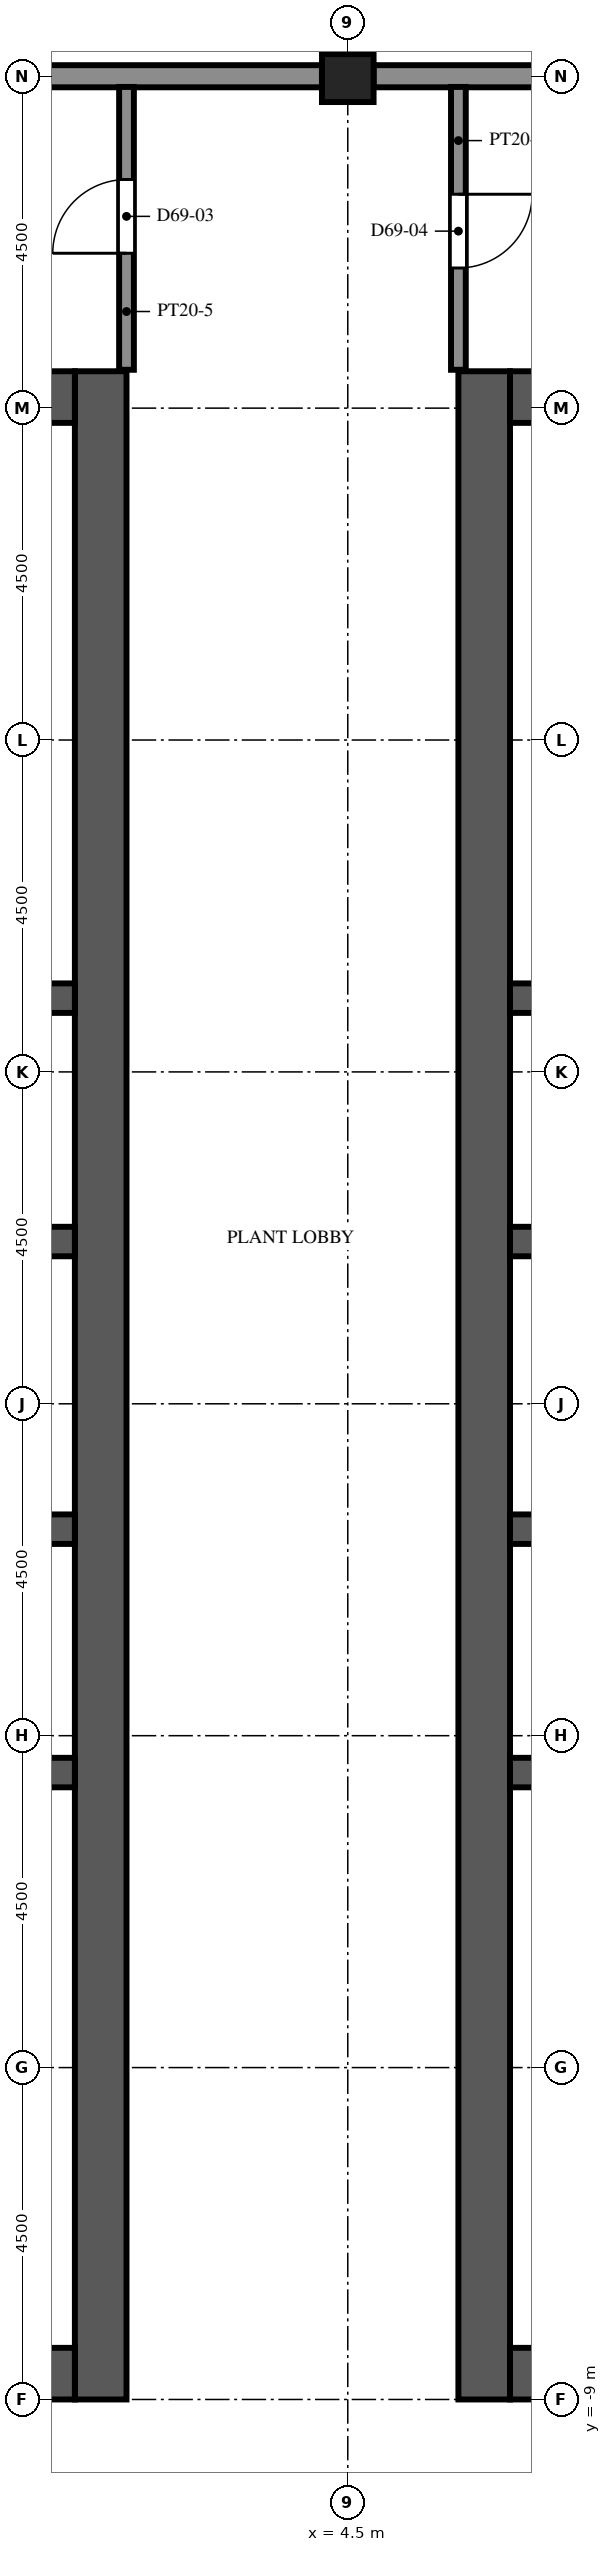
"""IFC4 building model, lengths in metres.
Left out: names, types, materials, properties, quantities, classifications, styles, units other than length and angle.
Written with IfcOpenShell. Run it as: python <this file> out.ifc"""

import sys

from ifc_helpers import new_model, si_unit, direction, frame, frame_2d, origin, origin_2d, place, context, subcontext, project, spatial, rectangle, extrude, element, fill, save


model = new_model("IFC4")
c1 = context("Model", 3, precision=1e-05, world=origin(), true_north=direction((0.0, 1.0)))
c2 = subcontext(c1, "Body", "Model", "MODEL_VIEW")
j1 = project(units=[si_unit("LENGTHUNIT", "METRE"), si_unit("PLANEANGLEUNIT", "RADIAN")], contexts=[c1])
p1 = place(None, origin())
s1 = spatial("IfcSite", under=j1, at=p1, CompositionType="ELEMENT")
p2 = place(p1, origin())
s2 = spatial("IfcBuilding", under=s1, at=p2, CompositionType="ELEMENT")
p3 = place(p2, frame((0.0, 0.0, 306.4)))
s3 = spatial("IfcBuildingStorey", under=s2, at=p3, CompositionType="ELEMENT", Elevation=306.4)
p4 = place(p3, frame((4.5, 22.5, 0.0), z_axis=(0.0, 0.0, 1.0), x_axis=(1.0, 0.0, 0.0)))
e1 = element("IfcColumn", 1, at=p4, inside=s3, PredefinedType="COLUMN", context=c2, shape_type="SweptSolid", body=[
    extrude(rectangle(XDim=0.7, YDim=0.7, at=origin_2d()), origin(), (0.0, 0.0, 1.0), 5.4),
])
p5 = place(p3, frame((1.15, -9.0, 0.0), z_axis=(0.0, 0.0, 1.0), x_axis=(0.0, 1.0, 0.0)))
e2 = element("IfcWall", 2, at=p5, inside=s3, PredefinedType="SHEAR", context=c2, shape_type="SweptSolid", body=[
    extrude(rectangle(XDim=27.5, YDim=0.7, at=frame_2d((13.75, 0.0))), origin(), (0.0, 0.0, 1.0), 5.4),
])
p6 = place(p5, frame((12.55, 0.0, 0.0)))
e3 = element("IfcOpeningElement", 3, at=p6, cuts=e2, PredefinedType="OPENING", context=c2, shape_type="SweptSolid", body=[
    extrude(rectangle(XDim=2.4, YDim=2.4, at=frame_2d((1.2, 1.2))), frame((0.0, 0.36, 0.0), z_axis=(0.0, -1.0, 0.0), x_axis=(1.0, 0.0, 0.0)), (0.0, 0.0, 1.0), 0.72),
])
p7 = place(p5, frame((5.46, 0.0, 0.0)))
e4 = element("IfcOpeningElement", 4, at=p7, cuts=e2, PredefinedType="OPENING", context=c2, shape_type="SweptSolid", body=[
    extrude(rectangle(XDim=0.968, YDim=2.1, at=frame_2d((0.484, 1.05))), frame((0.0, 0.36, 0.0), z_axis=(0.0, -1.0, 0.0), x_axis=(1.0, 0.0, 0.0)), (0.0, 0.0, 1.0), 0.72),
])
p8 = place(p5, frame((23.54, 0.0, 0.0)))
e5 = element("IfcOpeningElement", 5, at=p8, cuts=e2, PredefinedType="OPENING", context=c2, shape_type="SweptSolid", body=[
    extrude(rectangle(XDim=1.2, YDim=2.1, at=frame_2d((0.6, 1.05))), frame((0.0, 0.36, 0.0), z_axis=(0.0, -1.0, 0.0), x_axis=(1.0, 0.0, 0.0)), (0.0, 0.0, 1.0), 0.72),
])
for number, where, z_axis, x_axis in (
    (6, (-9.8, -8.65, 0.0), (0.0, 0.0, 1.0), (1.0, 0.0, 0.0)),
    (7, (-9.8, 18.15, 0.0), (0.0, 0.0, 1.0), (1.0, 0.0, 0.0)),
):
    element("IfcWall", number, at=place(p3, frame(where, z_axis=z_axis, x_axis=x_axis)), inside=s3, PredefinedType="SHEAR", context=c2, shape_type="SweptSolid", body=[
        extrude(rectangle(XDim=10.6, YDim=0.7, at=frame_2d((5.3, 0.0))), origin(), (0.0, 0.0, 1.0), 5.4),
    ])
p9 = place(p3, frame((-9.8, -0.5, 0.0), z_axis=(0.0, 0.0, 1.0), x_axis=(1.0, 0.0, 0.0)))
e8 = element("IfcWall", 8, at=p9, inside=s3, PredefinedType="SHEAR", context=c2, shape_type="SweptSolid", body=[
    extrude(rectangle(XDim=10.6, YDim=0.4, at=frame_2d((5.3, 0.0))), origin(), (0.0, 0.0, 1.0), 5.4),
])
p10 = place(p3, frame((-9.8, 2.8, 0.0), z_axis=(0.0, 0.0, 1.0), x_axis=(1.0, 0.0, 0.0)))
e9 = element("IfcWall", 9, at=p10, inside=s3, PredefinedType="SHEAR", context=c2, shape_type="SweptSolid", body=[
    extrude(rectangle(XDim=10.6, YDim=0.4, at=frame_2d((5.3, 0.0))), origin(), (0.0, 0.0, 1.0), 5.4),
])
p11 = place(p10, frame((0.688, 0.0, 0.0)))
e10 = element("IfcOpeningElement", 10, at=p11, cuts=e9, PredefinedType="OPENING", context=c2, shape_type="SweptSolid", body=[
    extrude(rectangle(XDim=1.1, YDim=2.1, at=frame_2d((0.55, 1.05))), frame((0.0, 0.21, 0.0), z_axis=(0.0, -1.0, 0.0), x_axis=(1.0, 0.0, 0.0)), (0.0, 0.0, 1.0), 0.42),
])
p12 = place(p10, frame((3.438, 0.0, 0.0)))
e11 = element("IfcOpeningElement", 11, at=p12, cuts=e9, PredefinedType="OPENING", context=c2, shape_type="SweptSolid", body=[
    extrude(rectangle(XDim=1.1, YDim=2.1, at=frame_2d((0.55, 1.05))), frame((0.0, 0.21, 0.0), z_axis=(0.0, -1.0, 0.0), x_axis=(1.0, 0.0, 0.0)), (0.0, 0.0, 1.0), 0.42),
])
p13 = place(p10, frame((6.113, 0.0, 0.0)))
e12 = element("IfcOpeningElement", 12, at=p13, cuts=e9, PredefinedType="OPENING", context=c2, shape_type="SweptSolid", body=[
    extrude(rectangle(XDim=1.0, YDim=2.1, at=frame_2d((0.5, 1.05))), frame((0.0, 0.21, 0.0), z_axis=(0.0, -1.0, 0.0), x_axis=(1.0, 0.0, 0.0)), (0.0, 0.0, 1.0), 0.42),
])
p14 = place(p10, frame((8.863, 0.0, 0.0)))
e13 = element("IfcOpeningElement", 13, at=p14, cuts=e9, PredefinedType="OPENING", context=c2, shape_type="SweptSolid", body=[
    extrude(rectangle(XDim=1.0, YDim=2.1, at=frame_2d((0.5, 1.05))), frame((0.0, 0.21, 0.0), z_axis=(0.0, -1.0, 0.0), x_axis=(1.0, 0.0, 0.0)), (0.0, 0.0, 1.0), 0.42),
])
p15 = place(p3, frame((-9.8, 6.7, 0.0), z_axis=(0.0, 0.0, 1.0), x_axis=(1.0, 0.0, 0.0)))
e14 = element("IfcWall", 14, at=p15, inside=s3, PredefinedType="SHEAR", context=c2, shape_type="SweptSolid", body=[
    extrude(rectangle(XDim=10.6, YDim=0.4, at=frame_2d((5.3, 0.0))), origin(), (0.0, 0.0, 1.0), 5.4),
])
p16 = place(p15, frame((0.738, 0.0, 0.0)))
e15 = element("IfcOpeningElement", 15, at=p16, cuts=e14, PredefinedType="OPENING", context=c2, shape_type="SweptSolid", body=[
    extrude(rectangle(XDim=1.0, YDim=2.1, at=frame_2d((0.5, 1.05))), frame((0.0, 0.21, 0.0), z_axis=(0.0, -1.0, 0.0), x_axis=(1.0, 0.0, 0.0)), (0.0, 0.0, 1.0), 0.42),
])
p17 = place(p15, frame((3.488, 0.0, 0.0)))
e16 = element("IfcOpeningElement", 16, at=p17, cuts=e14, PredefinedType="OPENING", context=c2, shape_type="SweptSolid", body=[
    extrude(rectangle(XDim=1.0, YDim=2.1, at=frame_2d((0.5, 1.05))), frame((0.0, 0.21, 0.0), z_axis=(0.0, -1.0, 0.0), x_axis=(1.0, 0.0, 0.0)), (0.0, 0.0, 1.0), 0.42),
])
p18 = place(p15, frame((6.113, 0.0, 0.0)))
e17 = element("IfcOpeningElement", 17, at=p18, cuts=e14, PredefinedType="OPENING", context=c2, shape_type="SweptSolid", body=[
    extrude(rectangle(XDim=1.0, YDim=2.1, at=frame_2d((0.5, 1.05))), frame((0.0, 0.21, 0.0), z_axis=(0.0, -1.0, 0.0), x_axis=(1.0, 0.0, 0.0)), (0.0, 0.0, 1.0), 0.42),
])
p19 = place(p15, frame((8.863, 0.0, 0.0)))
e18 = element("IfcOpeningElement", 18, at=p19, cuts=e14, PredefinedType="OPENING", context=c2, shape_type="SweptSolid", body=[
    extrude(rectangle(XDim=1.0, YDim=2.1, at=frame_2d((0.5, 1.05))), frame((0.0, 0.21, 0.0), z_axis=(0.0, -1.0, 0.0), x_axis=(1.0, 0.0, 0.0)), (0.0, 0.0, 1.0), 0.42),
])
p20 = place(p3, frame((-9.8, 10.0, 0.0), z_axis=(0.0, 0.0, 1.0), x_axis=(1.0, 0.0, 0.0)))
e19 = element("IfcWall", 19, at=p20, inside=s3, PredefinedType="SHEAR", context=c2, shape_type="SweptSolid", body=[
    extrude(rectangle(XDim=10.6, YDim=0.4, at=frame_2d((5.3, 0.0))), origin(), (0.0, 0.0, 1.0), 5.4),
])
p21 = place(p3, frame((6.35, -9.0, 0.0), z_axis=(0.0, 0.0, 1.0), x_axis=(0.0, 1.0, 0.0)))
e20 = element("IfcWall", 20, at=p21, inside=s3, PredefinedType="SHEAR", context=c2, shape_type="SweptSolid", body=[
    extrude(rectangle(XDim=27.5, YDim=0.7, at=frame_2d((13.75, 0.0))), origin(), (0.0, 0.0, 1.0), 5.4),
])
p22 = place(p21, frame((12.55, 0.0, 0.0)))
e21 = element("IfcOpeningElement", 21, at=p22, cuts=e20, PredefinedType="OPENING", context=c2, shape_type="SweptSolid", body=[
    extrude(rectangle(XDim=2.4, YDim=2.4, at=frame_2d((1.2, 1.2))), frame((0.0, 0.36, 0.0), z_axis=(0.0, -1.0, 0.0), x_axis=(1.0, 0.0, 0.0)), (0.0, 0.0, 1.0), 0.72),
])
p23 = place(p21, frame((3.9, 0.0, 0.0)))
e22 = element("IfcOpeningElement", 22, at=p23, cuts=e20, PredefinedType="OPENING", context=c2, shape_type="SweptSolid", body=[
    extrude(rectangle(XDim=1.2, YDim=2.1, at=frame_2d((0.6, 1.05))), frame((0.0, 0.36, 0.0), z_axis=(0.0, -1.0, 0.0), x_axis=(1.0, 0.0, 0.0)), (0.0, 0.0, 1.0), 0.72),
])
p24 = place(p21, frame((22.4, 0.0, 0.0)))
e23 = element("IfcOpeningElement", 23, at=p24, cuts=e20, PredefinedType="OPENING", context=c2, shape_type="SweptSolid", body=[
    extrude(rectangle(XDim=1.2, YDim=2.1, at=frame_2d((0.6, 1.05))), frame((0.0, 0.36, 0.0), z_axis=(0.0, -1.0, 0.0), x_axis=(1.0, 0.0, 0.0)), (0.0, 0.0, 1.0), 0.72),
])
for number, where, z_axis, x_axis in (
    (24, (6.7, -8.65, 0.0), (0.0, 0.0, 1.0), (1.0, 0.0, 0.0)),
    (25, (6.7, 18.15, 0.0), (0.0, 0.0, 1.0), (1.0, 0.0, 0.0)),
):
    element("IfcWall", number, at=place(p3, frame(where, z_axis=z_axis, x_axis=x_axis)), inside=s3, PredefinedType="SHEAR", context=c2, shape_type="SweptSolid", body=[
        extrude(rectangle(XDim=10.6, YDim=0.7, at=frame_2d((5.3, 0.0))), origin(), (0.0, 0.0, 1.0), 5.4),
    ])
p25 = place(p3, frame((6.7, -0.5, 0.0), z_axis=(0.0, 0.0, 1.0), x_axis=(1.0, 0.0, 0.0)))
e26 = element("IfcWall", 26, at=p25, inside=s3, PredefinedType="SHEAR", context=c2, shape_type="SweptSolid", body=[
    extrude(rectangle(XDim=10.6, YDim=0.4, at=frame_2d((5.3, 0.0))), origin(), (0.0, 0.0, 1.0), 5.4),
])
p26 = place(p3, frame((6.7, 2.8, 0.0), z_axis=(0.0, 0.0, 1.0), x_axis=(1.0, 0.0, 0.0)))
e27 = element("IfcWall", 27, at=p26, inside=s3, PredefinedType="SHEAR", context=c2, shape_type="SweptSolid", body=[
    extrude(rectangle(XDim=10.6, YDim=0.4, at=frame_2d((5.3, 0.0))), origin(), (0.0, 0.0, 1.0), 5.4),
])
p27 = place(p26, frame((0.688, 0.0, 0.0)))
e28 = element("IfcOpeningElement", 28, at=p27, cuts=e27, PredefinedType="OPENING", context=c2, shape_type="SweptSolid", body=[
    extrude(rectangle(XDim=1.1, YDim=2.1, at=frame_2d((0.55, 1.05))), frame((0.0, 0.21, 0.0), z_axis=(0.0, -1.0, 0.0), x_axis=(1.0, 0.0, 0.0)), (0.0, 0.0, 1.0), 0.42),
])
p28 = place(p26, frame((3.438, 0.0, 0.0)))
e29 = element("IfcOpeningElement", 29, at=p28, cuts=e27, PredefinedType="OPENING", context=c2, shape_type="SweptSolid", body=[
    extrude(rectangle(XDim=1.1, YDim=2.1, at=frame_2d((0.55, 1.05))), frame((0.0, 0.21, 0.0), z_axis=(0.0, -1.0, 0.0), x_axis=(1.0, 0.0, 0.0)), (0.0, 0.0, 1.0), 0.42),
])
p29 = place(p26, frame((6.113, 0.0, 0.0)))
e30 = element("IfcOpeningElement", 30, at=p29, cuts=e27, PredefinedType="OPENING", context=c2, shape_type="SweptSolid", body=[
    extrude(rectangle(XDim=1.0, YDim=2.1, at=frame_2d((0.5, 1.05))), frame((0.0, 0.21, 0.0), z_axis=(0.0, -1.0, 0.0), x_axis=(1.0, 0.0, 0.0)), (0.0, 0.0, 1.0), 0.42),
])
p30 = place(p26, frame((8.863, 0.0, 0.0)))
e31 = element("IfcOpeningElement", 31, at=p30, cuts=e27, PredefinedType="OPENING", context=c2, shape_type="SweptSolid", body=[
    extrude(rectangle(XDim=1.0, YDim=2.1, at=frame_2d((0.5, 1.05))), frame((0.0, 0.21, 0.0), z_axis=(0.0, -1.0, 0.0), x_axis=(1.0, 0.0, 0.0)), (0.0, 0.0, 1.0), 0.42),
])
p31 = place(p3, frame((6.7, 6.7, 0.0), z_axis=(0.0, 0.0, 1.0), x_axis=(1.0, 0.0, 0.0)))
e32 = element("IfcWall", 32, at=p31, inside=s3, PredefinedType="SHEAR", context=c2, shape_type="SweptSolid", body=[
    extrude(rectangle(XDim=10.6, YDim=0.4, at=frame_2d((5.3, 0.0))), origin(), (0.0, 0.0, 1.0), 5.4),
])
p32 = place(p31, frame((0.738, 0.0, 0.0)))
e33 = element("IfcOpeningElement", 33, at=p32, cuts=e32, PredefinedType="OPENING", context=c2, shape_type="SweptSolid", body=[
    extrude(rectangle(XDim=1.0, YDim=2.1, at=frame_2d((0.5, 1.05))), frame((0.0, 0.21, 0.0), z_axis=(0.0, -1.0, 0.0), x_axis=(1.0, 0.0, 0.0)), (0.0, 0.0, 1.0), 0.42),
])
p33 = place(p31, frame((3.488, 0.0, 0.0)))
e34 = element("IfcOpeningElement", 34, at=p33, cuts=e32, PredefinedType="OPENING", context=c2, shape_type="SweptSolid", body=[
    extrude(rectangle(XDim=1.0, YDim=2.1, at=frame_2d((0.5, 1.05))), frame((0.0, 0.21, 0.0), z_axis=(0.0, -1.0, 0.0), x_axis=(1.0, 0.0, 0.0)), (0.0, 0.0, 1.0), 0.42),
])
p34 = place(p31, frame((6.113, 0.0, 0.0)))
e35 = element("IfcOpeningElement", 35, at=p34, cuts=e32, PredefinedType="OPENING", context=c2, shape_type="SweptSolid", body=[
    extrude(rectangle(XDim=1.0, YDim=2.1, at=frame_2d((0.5, 1.05))), frame((0.0, 0.21, 0.0), z_axis=(0.0, -1.0, 0.0), x_axis=(1.0, 0.0, 0.0)), (0.0, 0.0, 1.0), 0.42),
])
p35 = place(p31, frame((8.863, 0.0, 0.0)))
e36 = element("IfcOpeningElement", 36, at=p35, cuts=e32, PredefinedType="OPENING", context=c2, shape_type="SweptSolid", body=[
    extrude(rectangle(XDim=1.0, YDim=2.1, at=frame_2d((0.5, 1.05))), frame((0.0, 0.21, 0.0), z_axis=(0.0, -1.0, 0.0), x_axis=(1.0, 0.0, 0.0)), (0.0, 0.0, 1.0), 0.42),
])
p36 = place(p3, frame((6.7, 10.0, 0.0), z_axis=(0.0, 0.0, 1.0), x_axis=(1.0, 0.0, 0.0)))
e37 = element("IfcWall", 37, at=p36, inside=s3, PredefinedType="SHEAR", context=c2, shape_type="SweptSolid", body=[
    extrude(rectangle(XDim=10.6, YDim=0.4, at=frame_2d((5.3, 0.0))), origin(), (0.0, 0.0, 1.0), 5.4),
])
for number, where, z_axis, x_axis in (
    (38, (8.65, 22.5, 0.0), (0.0, 0.0, 1.0), (-1.0, 0.0, 0.0)),
    (39, (4.15, 22.5, 0.0), (0.0, 0.0, 1.0), (-1.0, 0.0, 0.0)),
):
    element("IfcWall", number, at=place(p3, frame(where, z_axis=z_axis, x_axis=x_axis)), inside=s3, PredefinedType="SOLIDWALL", context=c2, shape_type="SweptSolid", body=[
        extrude(rectangle(XDim=3.8, YDim=0.3, at=frame_2d((1.9, 0.0))), origin(), (0.0, 0.0, 1.0), 0.85),
    ])
p37 = place(p3, frame((1.5, 18.52, 0.0), z_axis=(0.0, 0.0, 1.0), x_axis=(0.0, 1.0, 0.0)))
e40 = element("IfcWall", 40, at=p37, inside=s3, PredefinedType="PARTITIONING", context=c2, shape_type="SweptSolid", body=[
    extrude(rectangle(XDim=3.835, YDim=0.2, at=frame_2d((1.917, 0.0))), origin(), (0.0, 0.0, 1.0), 4.8),
])
p38 = place(p37, frame((1.58, 0.0, 0.0)))
e41 = element("IfcOpeningElement", 41, at=p38, cuts=e40, PredefinedType="OPENING", context=c2, shape_type="SweptSolid", body=[
    extrude(rectangle(XDim=1.0, YDim=2.1, at=frame_2d((0.5, 1.05))), frame((0.0, 0.11, 0.0), z_axis=(0.0, -1.0, 0.0), x_axis=(1.0, 0.0, 0.0)), (0.0, 0.0, 1.0), 0.22),
])
p39 = place(p3, frame((6.0, 22.355, 0.0), z_axis=(0.0, 0.0, 1.0), x_axis=(0.0, -1.0, 0.0)))
e42 = element("IfcWall", 42, at=p39, inside=s3, PredefinedType="PARTITIONING", context=c2, shape_type="SweptSolid", body=[
    extrude(rectangle(XDim=3.835, YDim=0.2, at=frame_2d((1.917, 0.0))), origin(), (0.0, 0.0, 1.0), 4.8),
])
p40 = place(p39, frame((1.455, 0.0, 0.0)))
e43 = element("IfcOpeningElement", 43, at=p40, cuts=e42, PredefinedType="OPENING", context=c2, shape_type="SweptSolid", body=[
    extrude(rectangle(XDim=1.0, YDim=2.1, at=frame_2d((0.5, 1.05))), frame((0.0, 0.11, 0.0), z_axis=(0.0, -1.0, 0.0), x_axis=(1.0, 0.0, 0.0)), (0.0, 0.0, 1.0), 0.22),
])
p41 = place(p3, frame((-1.75, -3.74, 0.0), z_axis=(0.0, 0.0, 1.0), x_axis=(1.0, 0.0, 0.0)))
e44 = element("IfcWall", 44, at=p41, inside=s3, PredefinedType="PARTITIONING", context=c2, shape_type="SweptSolid", body=[
    extrude(rectangle(XDim=2.55, YDim=0.1, at=frame_2d((1.275, 0.0))), origin(), (0.0, 0.0, 1.0), 4.8),
])
p42 = place(p41, frame((0.775, 0.0, 0.0)))
e45 = element("IfcOpeningElement", 45, at=p42, cuts=e44, PredefinedType="OPENING", context=c2, shape_type="SweptSolid", body=[
    extrude(rectangle(XDim=1.0, YDim=2.1, at=frame_2d((0.5, 1.05))), frame((0.0, 0.06, 0.0), z_axis=(0.0, -1.0, 0.0), x_axis=(1.0, 0.0, 0.0)), (0.0, 0.0, 1.0), 0.12),
])
p43 = place(p3, frame((-1.75, -2.372, 0.0), z_axis=(0.0, 0.0, 1.0), x_axis=(1.0, 0.0, 0.0)))
e46 = element("IfcWall", 46, at=p43, inside=s3, PredefinedType="PARTITIONING", context=c2, shape_type="SweptSolid", body=[
    extrude(rectangle(XDim=2.55, YDim=0.1, at=frame_2d((1.275, 0.0))), origin(), (0.0, 0.0, 1.0), 4.8),
])
p44 = place(p43, frame((0.775, 0.0, 0.0)))
e47 = element("IfcOpeningElement", 47, at=p44, cuts=e46, PredefinedType="OPENING", context=c2, shape_type="SweptSolid", body=[
    extrude(rectangle(XDim=1.0, YDim=2.1, at=frame_2d((0.5, 1.05))), frame((0.0, 0.06, 0.0), z_axis=(0.0, -1.0, 0.0), x_axis=(1.0, 0.0, 0.0)), (0.0, 0.0, 1.0), 0.12),
])
p45 = place(p3, frame((-0.5, 12.48, 0.0), z_axis=(0.0, 0.0, 1.0), x_axis=(1.0, 0.0, 0.0)))
e48 = element("IfcWall", 48, at=p45, inside=s3, PredefinedType="PARTITIONING", context=c2, shape_type="SweptSolid", body=[
    extrude(rectangle(XDim=1.3, YDim=0.1, at=frame_2d((0.65, 0.0))), origin(), (0.0, 0.0, 1.0), 4.8),
])
p46 = place(p45, frame((0.2, 0.0, 0.0)))
e49 = element("IfcOpeningElement", 49, at=p46, cuts=e48, PredefinedType="OPENING", context=c2, shape_type="SweptSolid", body=[
    extrude(rectangle(XDim=0.9, YDim=2.1, at=frame_2d((0.45, 1.05))), frame((0.0, 0.06, 0.0), z_axis=(0.0, -1.0, 0.0), x_axis=(1.0, 0.0, 0.0)), (0.0, 0.0, 1.0), 0.12),
])
p47 = place(p38, origin())
e50 = element("IfcDoor", 50, at=p47, inside=s3, OperationType="SINGLE_SWING_LEFT", PredefinedType="DOOR", context=c2, shape_type="SweptSolid", body=[
    extrude(rectangle(XDim=1.0, YDim=2.1, at=frame_2d((0.5, 1.05))), frame((0.0, 0.025, 0.0), z_axis=(0.0, -1.0, 0.0), x_axis=(1.0, 0.0, 0.0)), (0.0, 0.0, 1.0), 0.05),
])
fill(e41, e50)
p48 = place(p40, origin())
e51 = element("IfcDoor", 51, at=p48, inside=s3, OperationType="SINGLE_SWING_LEFT", PredefinedType="DOOR", context=c2, shape_type="SweptSolid", body=[
    extrude(rectangle(XDim=1.0, YDim=2.1, at=frame_2d((0.5, 1.05))), frame((0.0, 0.025, 0.0), z_axis=(0.0, -1.0, 0.0), x_axis=(1.0, 0.0, 0.0)), (0.0, 0.0, 1.0), 0.05),
])
fill(e43, e51)
p49 = place(p6, origin())
e52 = element("IfcDoor", 52, at=p49, inside=s3, OperationType="DOUBLE_DOOR_DOUBLE_SWING", PredefinedType="DOOR", context=c2, shape_type="SweptSolid", body=[
    extrude(rectangle(XDim=2.4, YDim=2.4, at=frame_2d((1.2, 1.2))), frame((0.0, 0.025, 0.0), z_axis=(0.0, -1.0, 0.0), x_axis=(1.0, 0.0, 0.0)), (0.0, 0.0, 1.0), 0.05),
])
fill(e3, e52)
p50 = place(p22, origin())
e53 = element("IfcDoor", 53, at=p50, inside=s3, OperationType="DOUBLE_DOOR_DOUBLE_SWING", PredefinedType="DOOR", context=c2, shape_type="SweptSolid", body=[
    extrude(rectangle(XDim=2.4, YDim=2.4, at=frame_2d((1.2, 1.2))), frame((0.0, 0.025, 0.0), z_axis=(0.0, -1.0, 0.0), x_axis=(1.0, 0.0, 0.0)), (0.0, 0.0, 1.0), 0.05),
])
fill(e21, e53)
p51 = place(p7, origin())
e54 = element("IfcDoor", 54, at=p51, inside=s3, OperationType="SINGLE_SWING_LEFT", PredefinedType="DOOR", context=c2, shape_type="SweptSolid", body=[
    extrude(rectangle(XDim=0.968, YDim=2.1, at=frame_2d((0.484, 1.05))), frame((0.0, 0.325, 0.0), z_axis=(0.0, -1.0, 0.0), x_axis=(1.0, 0.0, 0.0)), (0.0, 0.0, 1.0), 0.05),
])
fill(e4, e54)
p52 = place(p46, origin())
e55 = element("IfcDoor", 55, at=p52, inside=s3, OperationType="SINGLE_SWING_LEFT", PredefinedType="DOOR", context=c2, shape_type="SweptSolid", body=[
    extrude(rectangle(XDim=0.9, YDim=2.1, at=frame_2d((0.45, 1.05))), frame((0.0, 0.025, 0.0), z_axis=(0.0, -1.0, 0.0), x_axis=(1.0, 0.0, 0.0)), (0.0, 0.0, 1.0), 0.05),
])
fill(e49, e55)
p53 = place(p8, origin())
e56 = element("IfcDoor", 56, at=p53, inside=s3, OperationType="SINGLE_SWING_RIGHT", PredefinedType="DOOR", context=c2, shape_type="SweptSolid", body=[
    extrude(rectangle(XDim=1.2, YDim=2.1, at=frame_2d((0.6, 1.05))), frame((0.0, 0.325, 0.0), z_axis=(0.0, -1.0, 0.0), x_axis=(1.0, 0.0, 0.0)), (0.0, 0.0, 1.0), 0.05),
])
fill(e5, e56)
p54 = place(p23, origin())
e57 = element("IfcDoor", 57, at=p54, inside=s3, OperationType="SINGLE_SWING_RIGHT", PredefinedType="DOOR", context=c2, shape_type="SweptSolid", body=[
    extrude(rectangle(XDim=1.2, YDim=2.1, at=frame_2d((0.6, 1.05))), frame((0.0, -0.275, 0.0), z_axis=(0.0, -1.0, 0.0), x_axis=(1.0, 0.0, 0.0)), (0.0, 0.0, 1.0), 0.05),
])
fill(e22, e57)
p55 = place(p24, origin())
e58 = element("IfcDoor", 58, at=p55, inside=s3, OperationType="SINGLE_SWING_RIGHT", PredefinedType="DOOR", context=c2, shape_type="SweptSolid", body=[
    extrude(rectangle(XDim=1.2, YDim=2.1, at=frame_2d((0.6, 1.05))), frame((0.0, -0.275, 0.0), z_axis=(0.0, -1.0, 0.0), x_axis=(1.0, 0.0, 0.0)), (0.0, 0.0, 1.0), 0.05),
])
fill(e23, e58)
save(model, sys.argv[1])
